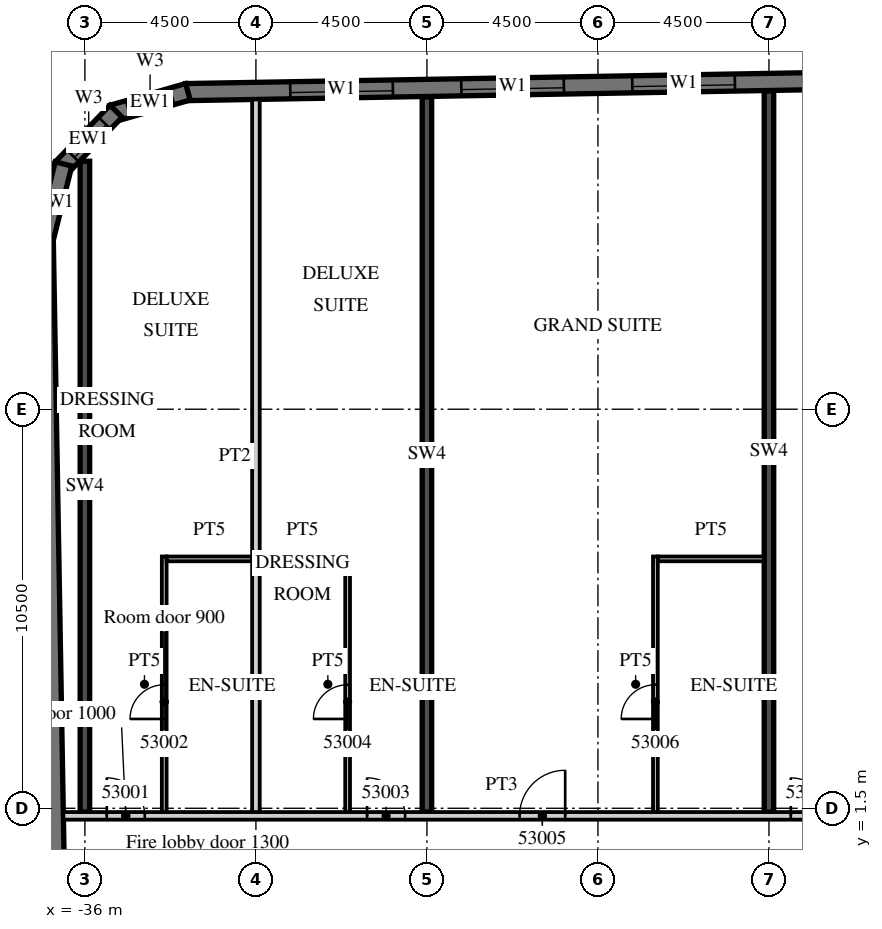
"""IFC4 building model, lengths in metres.
Left out: names, types, materials, properties, quantities, classifications, styles, units other than length and angle.
Written with IfcOpenShell. Run it as: python <this file> out.ifc"""

import sys

from ifc_helpers import new_model, si_unit, direction, frame, frame_2d, origin, place, context, subcontext, project, spatial, polyline, rectangle, outline, extrude, element, fill, save


model = new_model("IFC4")
c1 = context("Model", 3, precision=1e-05, world=origin(), true_north=direction((0.0, 1.0)))
c2 = subcontext(c1, "Body", "Model", "MODEL_VIEW")
j1 = project(units=[si_unit("LENGTHUNIT", "METRE"), si_unit("PLANEANGLEUNIT", "RADIAN")], contexts=[c1])
p1 = place(None, origin())
s1 = spatial("IfcSite", under=j1, at=p1, CompositionType="ELEMENT")
p2 = place(p1, origin())
s2 = spatial("IfcBuilding", under=s1, at=p2, CompositionType="ELEMENT")
p3 = place(p2, frame((0.0, 0.0, 221.0)))
s3 = spatial("IfcBuildingStorey", under=s2, at=p3, CompositionType="ELEMENT", Elevation=221.0)
p4 = place(p3, frame((-36.0, 1.4, 0.0), z_axis=(0.0, 0.0, 1.0), x_axis=(0.0, 1.0, 0.0)))
e1 = element("IfcWall", 1, at=p4, inside=s3, PredefinedType="SHEAR", context=c2, shape_type="SweptSolid", body=[
    extrude(rectangle(XDim=17.125, YDim=0.25, at=frame_2d((8.563, 0.0))), origin(), (0.0, 0.0, 1.0), 3.3),
])
p5 = place(p3, frame((-27.0, 1.4, 0.0), z_axis=(0.0, 0.0, 1.0), x_axis=(0.0, 1.0, 0.0)))
e2 = element("IfcWall", 2, at=p5, inside=s3, PredefinedType="SHEAR", context=c2, shape_type="SweptSolid", body=[
    extrude(rectangle(XDim=18.817, YDim=0.25, at=frame_2d((9.409, 0.0))), origin(), (0.0, 0.0, 1.0), 3.3),
])
p6 = place(p3, frame((-18.0, 1.4, 0.0), z_axis=(0.0, 0.0, 1.0), x_axis=(0.0, 1.0, 0.0)))
e3 = element("IfcWall", 3, at=p6, inside=s3, PredefinedType="SHEAR", context=c2, shape_type="SweptSolid", body=[
    extrude(rectangle(XDim=18.974, YDim=0.25, at=frame_2d((9.487, 0.0))), origin(), (0.0, 0.0, 1.0), 3.3),
])
p7 = place(p3, frame((-37.057, 16.503, 0.0), z_axis=(0.0, 0.0, 1.0), x_axis=(0.017452279857, -0.999847697366, 0.0)))
e4 = element("IfcWall", 4, at=p7, inside=s3, PredefinedType="SOLIDWALL", context=c2, shape_type="SweptSolid", body=[
    extrude(rectangle(XDim=33.0, YDim=0.45, at=frame_2d((16.5, 0.0))), origin(), (0.0, 0.0, 1.0), 3.02),
])
p8 = place(p3, frame((13.504, 21.161, 0.0), z_axis=(0.0, 0.0, 1.0), x_axis=(-0.999847763257, -0.017448504532, 0.0)))
e5 = element("IfcWall", 5, at=p8, inside=s3, PredefinedType="SOLIDWALL", context=c2, shape_type="SweptSolid", body=[
    extrude(rectangle(XDim=46.859, YDim=0.45, at=frame_2d((23.43, 0.0))), origin(), (0.0, 0.0, 1.0), 3.02),
])
p9 = place(p8, frame((0.9, 0.0, 0.45)))
e6 = element("IfcOpeningElement", 6, at=p9, cuts=e5, PredefinedType="OPENING", context=c2, shape_type="SweptSolid", body=[
    extrude(rectangle(XDim=2.7, YDim=2.25, at=frame_2d((1.35, 1.125))), frame((0.0, 0.235, 0.0), z_axis=(0.0, -1.0, 0.0), x_axis=(1.0, 0.0, 0.0)), (0.0, 0.0, 1.0), 0.47),
])
p10 = place(p8, frame((5.401, 0.0, 0.45)))
e7 = element("IfcOpeningElement", 7, at=p10, cuts=e5, PredefinedType="OPENING", context=c2, shape_type="SweptSolid", body=[
    extrude(rectangle(XDim=2.7, YDim=2.25, at=frame_2d((1.35, 1.125))), frame((0.0, 0.235, 0.0), z_axis=(0.0, -1.0, 0.0), x_axis=(1.0, 0.0, 0.0)), (0.0, 0.0, 1.0), 0.47),
])
p11 = place(p8, frame((9.902, 0.0, 0.45)))
e8 = element("IfcOpeningElement", 8, at=p11, cuts=e5, PredefinedType="OPENING", context=c2, shape_type="SweptSolid", body=[
    extrude(rectangle(XDim=2.7, YDim=2.25, at=frame_2d((1.35, 1.125))), frame((0.0, 0.235, 0.0), z_axis=(0.0, -1.0, 0.0), x_axis=(1.0, 0.0, 0.0)), (0.0, 0.0, 1.0), 0.47),
])
p12 = place(p8, frame((14.402, 0.0, 0.45)))
e9 = element("IfcOpeningElement", 9, at=p12, cuts=e5, PredefinedType="OPENING", context=c2, shape_type="SweptSolid", body=[
    extrude(rectangle(XDim=2.7, YDim=2.25, at=frame_2d((1.35, 1.125))), frame((0.0, 0.235, 0.0), z_axis=(0.0, -1.0, 0.0), x_axis=(1.0, 0.0, 0.0)), (0.0, 0.0, 1.0), 0.47),
])
p13 = place(p8, frame((18.903, 0.0, 0.45)))
e10 = element("IfcOpeningElement", 10, at=p13, cuts=e5, PredefinedType="OPENING", context=c2, shape_type="SweptSolid", body=[
    extrude(rectangle(XDim=2.7, YDim=2.25, at=frame_2d((1.35, 1.125))), frame((0.0, 0.235, 0.0), z_axis=(0.0, -1.0, 0.0), x_axis=(1.0, 0.0, 0.0)), (0.0, 0.0, 1.0), 0.47),
])
p14 = place(p8, frame((23.404, 0.0, 0.45)))
e11 = element("IfcOpeningElement", 11, at=p14, cuts=e5, PredefinedType="OPENING", context=c2, shape_type="SweptSolid", body=[
    extrude(rectangle(XDim=2.7, YDim=2.25, at=frame_2d((1.35, 1.125))), frame((0.0, 0.235, 0.0), z_axis=(0.0, -1.0, 0.0), x_axis=(1.0, 0.0, 0.0)), (0.0, 0.0, 1.0), 0.47),
])
p15 = place(p8, frame((27.904, 0.0, 0.45)))
e12 = element("IfcOpeningElement", 12, at=p15, cuts=e5, PredefinedType="OPENING", context=c2, shape_type="SweptSolid", body=[
    extrude(rectangle(XDim=2.7, YDim=2.25, at=frame_2d((1.35, 1.125))), frame((0.0, 0.235, 0.0), z_axis=(0.0, -1.0, 0.0), x_axis=(1.0, 0.0, 0.0)), (0.0, 0.0, 1.0), 0.47),
])
p16 = place(p8, frame((32.405, 0.0, 0.45)))
e13 = element("IfcOpeningElement", 13, at=p16, cuts=e5, PredefinedType="OPENING", context=c2, shape_type="SweptSolid", body=[
    extrude(rectangle(XDim=2.7, YDim=2.25, at=frame_2d((1.35, 1.125))), frame((0.0, 0.235, 0.0), z_axis=(0.0, -1.0, 0.0), x_axis=(1.0, 0.0, 0.0)), (0.0, 0.0, 1.0), 0.47),
])
p17 = place(p8, frame((36.906, 0.0, 0.45)))
e14 = element("IfcOpeningElement", 14, at=p17, cuts=e5, PredefinedType="OPENING", context=c2, shape_type="SweptSolid", body=[
    extrude(rectangle(XDim=2.7, YDim=2.25, at=frame_2d((1.35, 1.125))), frame((0.0, 0.235, 0.0), z_axis=(0.0, -1.0, 0.0), x_axis=(1.0, 0.0, 0.0)), (0.0, 0.0, 1.0), 0.47),
])
p18 = place(p8, frame((41.406, 0.0, 0.45)))
e15 = element("IfcOpeningElement", 15, at=p18, cuts=e5, PredefinedType="OPENING", context=c2, shape_type="SweptSolid", body=[
    extrude(rectangle(XDim=2.7, YDim=2.25, at=frame_2d((1.35, 1.125))), frame((0.0, 0.235, 0.0), z_axis=(0.0, -1.0, 0.0), x_axis=(1.0, 0.0, 0.0)), (0.0, 0.0, 1.0), 0.47),
])
p19 = place(p3, frame((-33.29, 20.352, 0.0), z_axis=(0.0, 0.0, 1.0), x_axis=(-0.961247584925, -0.275686562016, 0.0)))
e16 = element("IfcWall", 16, at=p19, inside=s3, PredefinedType="SOLIDWALL", context=c2, shape_type="SweptSolid", body=[
    extrude(outline(polyline([(0.0, -0.225), (2.071, -0.225), (1.95, 0.225), (0.121, 0.225), (0.0, -0.225)])), origin(), (0.0, 0.0, 1.0), 3.02),
])
p20 = place(p19, frame((0.435, 0.0, 0.45)))
e17 = element("IfcOpeningElement", 17, at=p20, cuts=e16, PredefinedType="OPENING", context=c2, shape_type="SweptSolid", body=[
    extrude(rectangle(XDim=1.2, YDim=2.25, at=frame_2d((0.6, 1.125))), frame((0.0, 0.235, 0.0), z_axis=(0.0, -1.0, 0.0), x_axis=(1.0, 0.0, 0.0)), (0.0, 0.0, 1.0), 0.47),
])
p21 = place(p3, frame((-35.181, 19.842, 0.0), z_axis=(0.0, 0.0, 1.0), x_axis=(-0.694678672846, -0.719320193998, 0.0)))
e18 = element("IfcWall", 18, at=p21, inside=s3, PredefinedType="SOLIDWALL", context=c2, shape_type="SweptSolid", body=[
    extrude(outline(polyline([(0.0, -0.225), (2.071, -0.225), (1.95, 0.225), (0.121, 0.225), (0.0, -0.225)])), origin(), (0.0, 0.0, 1.0), 3.02),
])
p22 = place(p21, frame((0.435, 0.0, 0.45)))
e19 = element("IfcOpeningElement", 19, at=p22, cuts=e18, PredefinedType="OPENING", context=c2, shape_type="SweptSolid", body=[
    extrude(rectangle(XDim=1.2, YDim=2.25, at=frame_2d((0.6, 1.125))), frame((0.0, 0.235, 0.0), z_axis=(0.0, -1.0, 0.0), x_axis=(1.0, 0.0, 0.0)), (0.0, 0.0, 1.0), 0.47),
])
p23 = place(p3, frame((-36.563, 18.454, 0.0), z_axis=(0.0, 0.0, 1.0), x_axis=(-0.241869623482, -0.970308757683, 0.0)))
e20 = element("IfcWall", 20, at=p23, inside=s3, PredefinedType="SOLIDWALL", context=c2, shape_type="SweptSolid", body=[
    extrude(outline(polyline([(-0.0, -0.225), (2.07, -0.225), (1.95, 0.225), (0.12, 0.225), (-0.0, -0.225)])), origin(), (0.0, 0.0, 1.0), 3.02),
])
p24 = place(p3, frame((-36.566, 1.3, 0.0), z_axis=(0.0, 0.0, 1.0), x_axis=(1.0, 0.0, 0.0)))
e21 = element("IfcWall", 21, at=p24, inside=s3, PredefinedType="PARTITIONING", context=c2, shape_type="SweptSolid", body=[
    extrude(rectangle(XDim=23.066, YDim=0.2, at=frame_2d((11.533, 0.0))), origin(), (0.0, 0.0, 1.0), 3.02),
])
p25 = place(p24, frame((1.141, 0.0, 0.0)))
e22 = element("IfcOpeningElement", 22, at=p25, cuts=e21, PredefinedType="OPENING", context=c2, shape_type="SweptSolid", body=[
    extrude(rectangle(XDim=1.0, YDim=2.1, at=frame_2d((0.5, 1.05))), frame((0.0, 0.11, 0.0), z_axis=(0.0, -1.0, 0.0), x_axis=(1.0, 0.0, 0.0)), (0.0, 0.0, 1.0), 0.22),
])
p26 = place(p24, frame((7.991, 0.0, 0.0)))
e23 = element("IfcOpeningElement", 23, at=p26, cuts=e21, PredefinedType="OPENING", context=c2, shape_type="SweptSolid", body=[
    extrude(rectangle(XDim=1.0, YDim=2.1, at=frame_2d((0.5, 1.05))), frame((0.0, 0.11, 0.0), z_axis=(0.0, -1.0, 0.0), x_axis=(1.0, 0.0, 0.0)), (0.0, 0.0, 1.0), 0.22),
])
p27 = place(p24, frame((12.004, 0.0, 0.0)))
e24 = element("IfcOpeningElement", 24, at=p27, cuts=e21, PredefinedType="OPENING", context=c2, shape_type="SweptSolid", body=[
    extrude(rectangle(XDim=1.2, YDim=2.1, at=frame_2d((0.6, 1.05))), frame((0.0, 0.11, 0.0), z_axis=(0.0, -1.0, 0.0), x_axis=(1.0, 0.0, 0.0)), (0.0, 0.0, 1.0), 0.22),
])
p28 = place(p24, frame((19.141, 0.0, 0.0)))
e25 = element("IfcOpeningElement", 25, at=p28, cuts=e21, PredefinedType="OPENING", context=c2, shape_type="SweptSolid", body=[
    extrude(rectangle(XDim=1.0, YDim=2.1, at=frame_2d((0.5, 1.05))), frame((0.0, 0.11, 0.0), z_axis=(0.0, -1.0, 0.0), x_axis=(1.0, 0.0, 0.0)), (0.0, 0.0, 1.0), 0.22),
])
p29 = place(p3, frame((-31.5, 1.4, 0.0), z_axis=(0.0, 0.0, 1.0), x_axis=(0.0, 1.0, 0.0)))
e26 = element("IfcWall", 26, at=p29, inside=s3, PredefinedType="PARTITIONING", context=c2, shape_type="SweptSolid", body=[
    extrude(rectangle(XDim=18.751, YDim=0.2, at=frame_2d((9.375, 0.0))), origin(), (0.0, 0.0, 1.0), 3.02),
])
p30 = place(p3, frame((-33.913, 1.4, 0.0), z_axis=(0.0, 0.0, 1.0), x_axis=(0.0, 1.0, 0.0)))
e27 = element("IfcWall", 27, at=p30, inside=s3, PredefinedType="PARTITIONING", context=c2, shape_type="SweptSolid", body=[
    extrude(rectangle(XDim=6.725, YDim=0.125, at=frame_2d((3.363, 0.0))), origin(), (0.0, 0.0, 1.0), 3.02),
])
p31 = place(p30, frame((2.45, 0.0, 0.0)))
e28 = element("IfcOpeningElement", 28, at=p31, cuts=e27, PredefinedType="OPENING", context=c2, shape_type="SweptSolid", body=[
    extrude(rectangle(XDim=0.9, YDim=2.1, at=frame_2d((0.45, 1.05))), frame((0.0, 0.073, 0.0), z_axis=(0.0, -1.0, 0.0), x_axis=(1.0, 0.0, 0.0)), (0.0, 0.0, 1.0), 0.145),
])
p32 = place(p3, frame((-33.85, 8.062, 0.0), z_axis=(0.0, 0.0, 1.0), x_axis=(1.0, 0.0, 0.0)))
e29 = element("IfcWall", 29, at=p32, inside=s3, PredefinedType="PARTITIONING", context=c2, shape_type="SweptSolid", body=[
    extrude(rectangle(XDim=2.25, YDim=0.125, at=frame_2d((1.125, 0.0))), origin(), (0.0, 0.0, 1.0), 3.02),
])
p33 = place(p3, frame((-29.087, 1.4, 0.0), z_axis=(0.0, 0.0, 1.0), x_axis=(0.0, 1.0, 0.0)))
e30 = element("IfcWall", 30, at=p33, inside=s3, PredefinedType="PARTITIONING", context=c2, shape_type="SweptSolid", body=[
    extrude(rectangle(XDim=6.725, YDim=0.125, at=frame_2d((3.363, 0.0))), origin(), (0.0, 0.0, 1.0), 3.02),
])
p34 = place(p33, frame((2.45, 0.0, 0.0)))
e31 = element("IfcOpeningElement", 31, at=p34, cuts=e30, PredefinedType="OPENING", context=c2, shape_type="SweptSolid", body=[
    extrude(rectangle(XDim=0.9, YDim=2.1, at=frame_2d((0.45, 1.05))), frame((0.0, 0.073, 0.0), z_axis=(0.0, -1.0, 0.0), x_axis=(1.0, 0.0, 0.0)), (0.0, 0.0, 1.0), 0.145),
])
p35 = place(p3, frame((-31.4, 8.062, 0.0), z_axis=(0.0, 0.0, 1.0), x_axis=(1.0, 0.0, 0.0)))
e32 = element("IfcWall", 32, at=p35, inside=s3, PredefinedType="PARTITIONING", context=c2, shape_type="SweptSolid", body=[
    extrude(rectangle(XDim=2.25, YDim=0.125, at=frame_2d((1.125, 0.0))), origin(), (0.0, 0.0, 1.0), 3.02),
])
p36 = place(p3, frame((-20.988, 1.4, 0.0), z_axis=(0.0, 0.0, 1.0), x_axis=(0.0, 1.0, 0.0)))
e33 = element("IfcWall", 33, at=p36, inside=s3, PredefinedType="PARTITIONING", context=c2, shape_type="SweptSolid", body=[
    extrude(rectangle(XDim=6.725, YDim=0.125, at=frame_2d((3.363, 0.0))), origin(), (0.0, 0.0, 1.0), 3.02),
])
p37 = place(p36, frame((2.45, 0.0, 0.0)))
e34 = element("IfcOpeningElement", 34, at=p37, cuts=e33, PredefinedType="OPENING", context=c2, shape_type="SweptSolid", body=[
    extrude(rectangle(XDim=0.9, YDim=2.1, at=frame_2d((0.45, 1.05))), frame((0.0, 0.073, 0.0), z_axis=(0.0, -1.0, 0.0), x_axis=(1.0, 0.0, 0.0)), (0.0, 0.0, 1.0), 0.145),
])
p38 = place(p3, frame((-20.925, 8.062, 0.0), z_axis=(0.0, 0.0, 1.0), x_axis=(1.0, 0.0, 0.0)))
e35 = element("IfcWall", 35, at=p38, inside=s3, PredefinedType="PARTITIONING", context=c2, shape_type="SweptSolid", body=[
    extrude(rectangle(XDim=2.8, YDim=0.125, at=frame_2d((1.4, 0.0))), origin(), (0.0, 0.0, 1.0), 3.02),
])
p39 = place(p16, origin())
e36 = element("IfcWindow", 36, at=p39, inside=s3, PartitioningType="SINGLE_PANEL", PredefinedType="WINDOW", context=c2, shape_type="SweptSolid", body=[
    extrude(rectangle(XDim=2.7, YDim=2.25, at=frame_2d((1.35, 1.125))), frame((0.0, 0.09, 0.0), z_axis=(0.0, -1.0, 0.0), x_axis=(1.0, 0.0, 0.0)), (0.0, 0.0, 1.0), 0.06),
])
fill(e13, e36)
p40 = place(p17, origin())
e37 = element("IfcWindow", 37, at=p40, inside=s3, PartitioningType="SINGLE_PANEL", PredefinedType="WINDOW", context=c2, shape_type="SweptSolid", body=[
    extrude(rectangle(XDim=2.7, YDim=2.25, at=frame_2d((1.35, 1.125))), frame((0.0, 0.09, 0.0), z_axis=(0.0, -1.0, 0.0), x_axis=(1.0, 0.0, 0.0)), (0.0, 0.0, 1.0), 0.06),
])
fill(e14, e37)
p41 = place(p18, origin())
e38 = element("IfcWindow", 38, at=p41, inside=s3, PartitioningType="SINGLE_PANEL", PredefinedType="WINDOW", context=c2, shape_type="SweptSolid", body=[
    extrude(rectangle(XDim=2.7, YDim=2.25, at=frame_2d((1.35, 1.125))), frame((0.0, 0.09, 0.0), z_axis=(0.0, -1.0, 0.0), x_axis=(1.0, 0.0, 0.0)), (0.0, 0.0, 1.0), 0.06),
])
fill(e15, e38)
p42 = place(p20, origin())
e39 = element("IfcWindow", 39, at=p42, inside=s3, PartitioningType="SINGLE_PANEL", PredefinedType="WINDOW", context=c2, shape_type="SweptSolid", body=[
    extrude(rectangle(XDim=1.2, YDim=2.25, at=frame_2d((0.6, 1.125))), frame((0.0, 0.09, 0.0), z_axis=(0.0, -1.0, 0.0), x_axis=(1.0, 0.0, 0.0)), (0.0, 0.0, 1.0), 0.06),
])
fill(e17, e39)
p43 = place(p22, origin())
e40 = element("IfcWindow", 40, at=p43, inside=s3, PartitioningType="SINGLE_PANEL", PredefinedType="WINDOW", context=c2, shape_type="SweptSolid", body=[
    extrude(rectangle(XDim=1.2, YDim=2.25, at=frame_2d((0.6, 1.125))), frame((0.0, 0.09, 0.0), z_axis=(0.0, -1.0, 0.0), x_axis=(1.0, 0.0, 0.0)), (0.0, 0.0, 1.0), 0.06),
])
fill(e19, e40)
p44 = place(p25, origin())
e41 = element("IfcDoor", 41, at=p44, inside=s3, OperationType="SINGLE_SWING_LEFT", PredefinedType="DOOR", context=c2, shape_type="SweptSolid", body=[
    extrude(rectangle(XDim=1.0, YDim=2.1, at=frame_2d((0.5, 1.05))), frame((0.0, 0.025, 0.0), z_axis=(0.0, -1.0, 0.0), x_axis=(1.0, 0.0, 0.0)), (0.0, 0.0, 1.0), 0.05),
])
fill(e22, e41)
p45 = place(p31, origin())
e42 = element("IfcDoor", 42, at=p45, inside=s3, OperationType="SINGLE_SWING_LEFT", PredefinedType="DOOR", context=c2, shape_type="SweptSolid", body=[
    extrude(rectangle(XDim=0.9, YDim=2.1, at=frame_2d((0.45, 1.05))), frame((0.0, 0.025, 0.0), z_axis=(0.0, -1.0, 0.0), x_axis=(1.0, 0.0, 0.0)), (0.0, 0.0, 1.0), 0.05),
])
fill(e28, e42)
p46 = place(p26, origin())
e43 = element("IfcDoor", 43, at=p46, inside=s3, OperationType="SINGLE_SWING_LEFT", PredefinedType="DOOR", context=c2, shape_type="SweptSolid", body=[
    extrude(rectangle(XDim=1.0, YDim=2.1, at=frame_2d((0.5, 1.05))), frame((0.0, 0.025, 0.0), z_axis=(0.0, -1.0, 0.0), x_axis=(1.0, 0.0, 0.0)), (0.0, 0.0, 1.0), 0.05),
])
fill(e23, e43)
p47 = place(p34, origin())
e44 = element("IfcDoor", 44, at=p47, inside=s3, OperationType="SINGLE_SWING_LEFT", PredefinedType="DOOR", context=c2, shape_type="SweptSolid", body=[
    extrude(rectangle(XDim=0.9, YDim=2.1, at=frame_2d((0.45, 1.05))), frame((0.0, 0.025, 0.0), z_axis=(0.0, -1.0, 0.0), x_axis=(1.0, 0.0, 0.0)), (0.0, 0.0, 1.0), 0.05),
])
fill(e31, e44)
p48 = place(p27, origin())
e45 = element("IfcDoor", 45, at=p48, inside=s3, OperationType="SINGLE_SWING_RIGHT", PredefinedType="DOOR", context=c2, shape_type="SweptSolid", body=[
    extrude(rectangle(XDim=1.2, YDim=2.1, at=frame_2d((0.6, 1.05))), frame((0.0, 0.025, 0.0), z_axis=(0.0, -1.0, 0.0), x_axis=(1.0, 0.0, 0.0)), (0.0, 0.0, 1.0), 0.05),
])
fill(e24, e45)
p49 = place(p37, origin())
e46 = element("IfcDoor", 46, at=p49, inside=s3, OperationType="SINGLE_SWING_LEFT", PredefinedType="DOOR", context=c2, shape_type="SweptSolid", body=[
    extrude(rectangle(XDim=0.9, YDim=2.1, at=frame_2d((0.45, 1.05))), frame((0.0, 0.025, 0.0), z_axis=(0.0, -1.0, 0.0), x_axis=(1.0, 0.0, 0.0)), (0.0, 0.0, 1.0), 0.05),
])
fill(e34, e46)
p50 = place(p28, origin())
e47 = element("IfcDoor", 47, at=p50, inside=s3, OperationType="SINGLE_SWING_LEFT", PredefinedType="DOOR", context=c2, shape_type="SweptSolid", body=[
    extrude(rectangle(XDim=1.0, YDim=2.1, at=frame_2d((0.5, 1.05))), frame((0.0, 0.025, 0.0), z_axis=(0.0, -1.0, 0.0), x_axis=(1.0, 0.0, 0.0)), (0.0, 0.0, 1.0), 0.05),
])
fill(e25, e47)
save(model, sys.argv[1])
